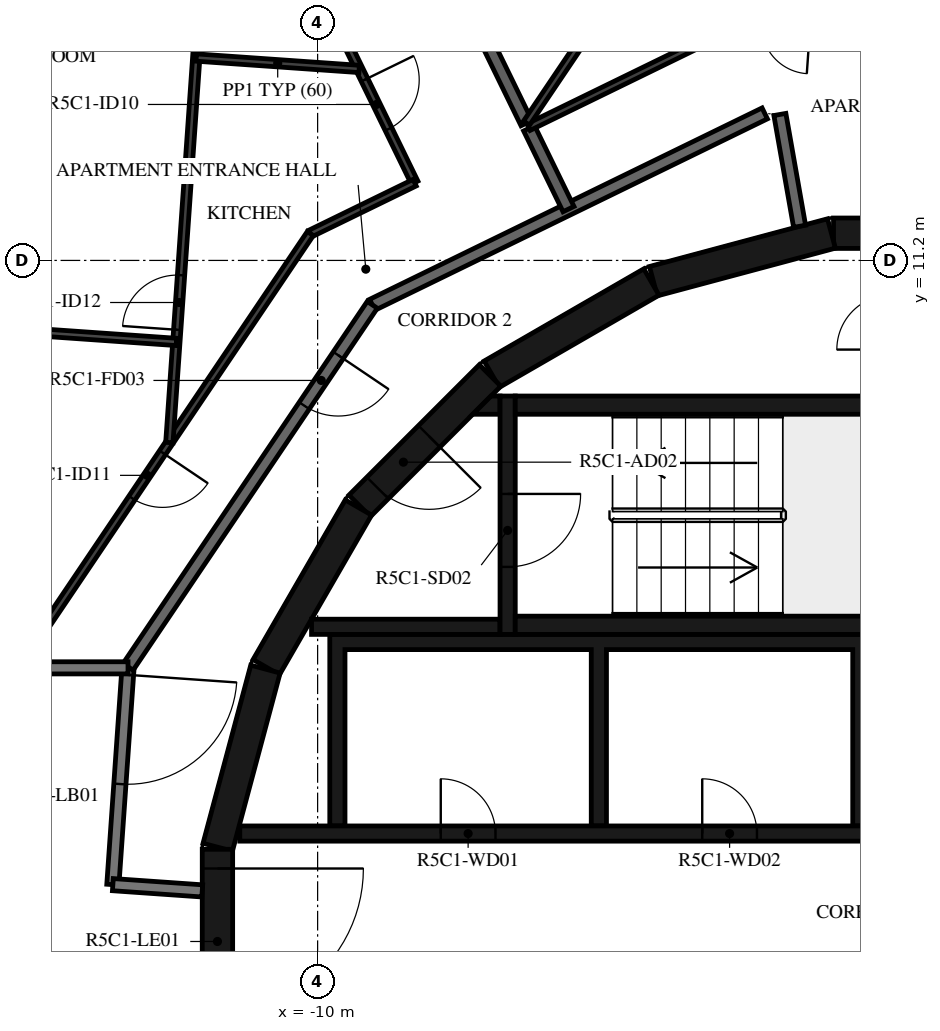
"""IFC4 building model, lengths in metres.
Left out: names, types, materials, properties, quantities, classifications, styles, units other than length and angle.
Written with IfcOpenShell. Run it as: python <this file> out.ifc"""

import sys

from ifc_helpers import new_model, si_unit, direction, frame, frame_2d, origin, place, context, subcontext, project, spatial, polyline, rectangle, outline, extrude, element, fill, save


model = new_model("IFC4")
c1 = context("Model", 3, precision=1e-05, world=origin(), true_north=direction((0.0, 1.0)))
c2 = subcontext(c1, "Body", "Model", "MODEL_VIEW")
j1 = project(units=[si_unit("LENGTHUNIT", "METRE"), si_unit("PLANEANGLEUNIT", "RADIAN")], contexts=[c1])
p1 = place(None, origin())
s1 = spatial("IfcSite", under=j1, at=p1, CompositionType="ELEMENT")
p2 = place(p1, origin())
s2 = spatial("IfcBuilding", under=s1, at=p2, CompositionType="ELEMENT")
p3 = place(p2, frame((0.0, 0.0, 212.9)))
s3 = spatial("IfcBuildingStorey", under=s2, at=p3, CompositionType="ELEMENT", Elevation=212.9)
for number, where, z_axis, x_axis in (
    (1, (1.516, 11.647, 0.0), (0.0, 0.0, 1.0), (-1.0, 0.0, 0.0)),
    (2, (-1.55, 11.643, 0.0), (0.0, 0.0, 1.0), (-0.966, -0.259, 0.0)),
    (3, (-4.51, 10.845, 0.0), (0.0, 0.0, 1.0), (-0.866, -0.5, 0.0)),
):
    element("IfcWall", number, at=place(p3, frame(where, z_axis=z_axis, x_axis=x_axis)), inside=s3, PredefinedType="SHEAR", context=c2, shape_type="SweptSolid", body=[
        extrude(rectangle(XDim=3.033, YDim=0.5, at=frame_2d((1.516, 0.0))), origin(), (0.0, 0.0, 1.0), 3.12),
    ])
p4 = place(p3, frame((-7.164, 9.308, 0.0), z_axis=(0.0, 0.0, 1.0), x_axis=(-0.707106781187, -0.707106781187, 0.0)))
e4 = element("IfcWall", 4, at=p4, inside=s3, PredefinedType="SHEAR", context=c2, shape_type="SweptSolid", body=[
    extrude(rectangle(XDim=3.032, YDim=0.5, at=frame_2d((1.516, 0.0))), origin(), (0.0, 0.0, 1.0), 3.12),
])
p5 = place(p4, frame((1.416, 0.0, 0.0)))
e5 = element("IfcOpeningElement", 5, at=p5, cuts=e4, PredefinedType="OPENING", context=c2, shape_type="SweptSolid", body=[
    extrude(rectangle(XDim=1.2, YDim=2.1, at=frame_2d((0.6, 1.05))), frame((0.0, 0.26, 0.0), z_axis=(0.0, -1.0, 0.0), x_axis=(1.0, 0.0, 0.0)), (0.0, 0.0, 1.0), 0.52),
])
for number, where, z_axis, x_axis in (
    (6, (-9.329, 7.137, 0.0), (0.0, 0.0, 1.0), (-0.5, -0.866, 0.0)),
    (7, (-10.858, 4.479, 0.0), (0.0, 0.0, 1.0), (-0.259, -0.966, 0.0)),
):
    element("IfcWall", number, at=place(p3, frame(where, z_axis=z_axis, x_axis=x_axis)), inside=s3, PredefinedType="SHEAR", context=c2, shape_type="SweptSolid", body=[
        extrude(rectangle(XDim=3.033, YDim=0.5, at=frame_2d((1.516, 0.0))), origin(), (0.0, 0.0, 1.0), 3.12),
    ])
p6 = place(p3, frame((-11.647, 1.516, 0.0), z_axis=(0.0, 0.0, 1.0), x_axis=(0.0, -1.0, 0.0)))
e8 = element("IfcWall", 8, at=p6, inside=s3, PredefinedType="SHEAR", context=c2, shape_type="SweptSolid", body=[
    extrude(rectangle(XDim=3.033, YDim=0.5, at=frame_2d((1.516, 0.0))), origin(), (0.0, 0.0, 1.0), 3.12),
])
p7 = place(p6, frame((0.316, 0.0, 0.0)))
e9 = element("IfcOpeningElement", 9, at=p7, cuts=e8, PredefinedType="OPENING", context=c2, shape_type="SweptSolid", body=[
    extrude(rectangle(XDim=2.4, YDim=2.1, at=frame_2d((1.2, 1.05))), frame((0.0, 0.26, 0.0), z_axis=(0.0, -1.0, 0.0), x_axis=(1.0, 0.0, 0.0)), (0.0, 0.0, 1.0), 0.52),
])
for number, where, z_axis, x_axis in (
    (10, (-6.75, 5.2, 0.0), (0.0, 0.0, 1.0), (1.0, 0.0, 0.0)),
    (11, (-6.75, 8.82, 0.0), (0.0, 0.0, 1.0), (1.0, 0.0, 0.0)),
):
    element("IfcWall", number, at=place(p3, frame(where, z_axis=z_axis, x_axis=x_axis)), inside=s3, PredefinedType="SHEAR", context=c2, shape_type="SweptSolid", body=[
        extrude(rectangle(XDim=6.75, YDim=0.3, at=frame_2d((3.375, 0.0))), origin(), (0.0, 0.0, 1.0), 3.12),
    ])
p8 = place(p3, frame((-6.875, 8.97, 0.0), z_axis=(0.0, 0.0, 1.0), x_axis=(0.0, -1.0, 0.0)))
e12 = element("IfcWall", 12, at=p8, inside=s3, PredefinedType="SHEAR", context=c2, shape_type="SweptSolid", body=[
    extrude(rectangle(XDim=3.92, YDim=0.25, at=frame_2d((1.96, 0.0))), origin(), (0.0, 0.0, 1.0), 3.12),
])
p9 = place(p8, frame((1.61, 0.0, 0.0)))
e13 = element("IfcOpeningElement", 13, at=p9, cuts=e12, PredefinedType="OPENING", context=c2, shape_type="SweptSolid", body=[
    extrude(rectangle(XDim=1.2, YDim=2.1, at=frame_2d((0.6, 1.05))), frame((0.0, 0.135, 0.0), z_axis=(0.0, -1.0, 0.0), x_axis=(1.0, 0.0, 0.0)), (0.0, 0.0, 1.0), 0.27),
])
p10 = place(p3, frame((-7.0, 5.175, 0.0), z_axis=(0.0, 0.0, 1.0), x_axis=(-1.0, 0.0, 0.0)))
e14 = element("IfcWall", 14, at=p10, inside=s3, PredefinedType="SHEAR", context=c2, shape_type="SweptSolid", body=[
    extrude(rectangle(XDim=3.1, YDim=0.25, at=frame_2d((1.55, 0.0))), origin(), (0.0, 0.0, 1.0), 3.12),
])
p11 = place(p3, origin())
e15 = element("IfcWall", 15, at=p11, inside=s3, PredefinedType="SHEAR", context=c2, shape_type="SweptSolid", body=[
    extrude(outline(polyline([(-7.148, 8.97), (-7.0, 8.97), (-7.0, 8.67), (-7.448, 8.67), (-7.148, 8.97)])), origin(), (0.0, 0.0, 1.0), 3.12),
])
p12 = place(p3, origin())
e16 = element("IfcWall", 16, at=p12, inside=s3, PredefinedType="SHEAR", context=c2, shape_type="SweptSolid", body=[
    extrude(outline(polyline([(-9.55, 4.8), (-5.5, 4.8), (-5.5, 1.9), (-5.25, 1.9), (-5.25, 4.8), (-1.2, 4.8), (-1.2, 1.9), (-0.95, 1.9), (-0.95, 4.8), (0.95, 4.8), (0.95, 1.9), (1.2, 1.9), (1.2, 4.8), (3.1, 4.8), (3.1, 1.9), (3.35, 1.9), (3.35, 4.8), (5.25, 4.8), (5.25, 1.9), (5.5, 1.9), (5.5, 4.8), (7.4, 4.8), (7.4, 1.9), (7.65, 1.9), (7.65, 4.8), (9.55, 4.8), (9.55, 1.9), (9.8, 1.9), (9.8, 4.8), (9.8, 5.05), (-9.8, 5.05), (-9.8, 4.8), (-9.8, 1.9), (-9.55, 1.9), (-9.55, 4.8)])), origin(), (0.0, 0.0, 1.0), 3.12),
])
p13 = place(p3, frame((-11.28, 1.775, 0.0), z_axis=(0.0, 0.0, 1.0), x_axis=(1.0, 0.0, 0.0)))
e17 = element("IfcWall", 17, at=p13, inside=s3, PredefinedType="SHEAR", context=c2, shape_type="SweptSolid", body=[
    extrude(rectangle(XDim=14.38, YDim=0.25, at=frame_2d((7.19, 0.0))), origin(), (0.0, 0.0, 1.0), 3.12),
])
p14 = place(p13, frame((10.73, 0.0, 0.0)))
e18 = element("IfcOpeningElement", 18, at=p14, cuts=e17, PredefinedType="OPENING", context=c2, shape_type="SweptSolid", body=[
    extrude(rectangle(XDim=1.1, YDim=2.1, at=frame_2d((0.55, 1.05))), frame((0.0, 0.135, 0.0), z_axis=(0.0, -1.0, 0.0), x_axis=(1.0, 0.0, 0.0)), (0.0, 0.0, 1.0), 0.27),
])
p15 = place(p13, frame((12.88, 0.0, 0.0)))
e19 = element("IfcOpeningElement", 19, at=p15, cuts=e17, PredefinedType="OPENING", context=c2, shape_type="SweptSolid", body=[
    extrude(rectangle(XDim=1.1, YDim=2.1, at=frame_2d((0.55, 1.05))), frame((0.0, 0.135, 0.0), z_axis=(0.0, -1.0, 0.0), x_axis=(1.0, 0.0, 0.0)), (0.0, 0.0, 1.0), 0.27),
])
p16 = place(p13, frame((3.305, 0.0, 0.0)))
e20 = element("IfcOpeningElement", 20, at=p16, cuts=e17, PredefinedType="OPENING", context=c2, shape_type="SweptSolid", body=[
    extrude(rectangle(XDim=0.9, YDim=2.1, at=frame_2d((0.45, 1.05))), frame((0.0, 0.135, 0.0), z_axis=(0.0, -1.0, 0.0), x_axis=(1.0, 0.0, 0.0)), (0.0, 0.0, 1.0), 0.27),
])
p17 = place(p13, frame((7.605, 0.0, 0.0)))
e21 = element("IfcOpeningElement", 21, at=p17, cuts=e17, PredefinedType="OPENING", context=c2, shape_type="SweptSolid", body=[
    extrude(rectangle(XDim=0.9, YDim=2.1, at=frame_2d((0.45, 1.05))), frame((0.0, 0.135, 0.0), z_axis=(0.0, -1.0, 0.0), x_axis=(1.0, 0.0, 0.0)), (0.0, 0.0, 1.0), 0.27),
])
p18 = place(p3, frame((-13.118, 4.5, 0.0), z_axis=(0.0, 0.0, 1.0), x_axis=(-0.069746872611, -0.99756472159, 0.0)))
e22 = element("IfcWall", 22, at=p18, inside=s3, PredefinedType="STANDARD", context=c2, shape_type="SweptSolid", body=[
    extrude(rectangle(XDim=3.574, YDim=0.2, at=frame_2d((1.787, 0.0))), origin(), (0.0, 0.0, 1.0), 3.12),
])
p19 = place(p18, frame((0.115, 0.0, 0.0)))
e23 = element("IfcOpeningElement", 23, at=p19, cuts=e22, PredefinedType="OPENING", context=c2, shape_type="SweptSolid", body=[
    extrude(rectangle(XDim=1.8, YDim=2.1, at=frame_2d((0.9, 1.05))), frame((0.0, 0.11, 0.0), z_axis=(0.0, -1.0, 0.0), x_axis=(1.0, 0.0, 0.0)), (0.0, 0.0, 1.0), 0.22),
])
p20 = place(p3, frame((-13.367, 0.935, 0.0), z_axis=(0.0, 0.0, 1.0), x_axis=(0.997553656289, -0.069904955655, 0.0)))
e24 = element("IfcWall", 24, at=p20, inside=s3, PredefinedType="STANDARD", context=c2, shape_type="SweptSolid", body=[
    extrude(rectangle(XDim=1.474, YDim=0.2, at=frame_2d((0.737, 0.0))), origin(), (0.0, 0.0, 1.0), 3.12),
])
p21 = place(p3, frame((-2.074, 11.761, 0.0), z_axis=(0.0, 0.0, 1.0), x_axis=(-0.173740587112, 0.984791454263, 0.0)))
e25 = element("IfcWall", 25, at=p21, inside=s3, PredefinedType="STANDARD", context=c2, shape_type="SweptSolid", body=[
    extrude(rectangle(XDim=1.867, YDim=0.2, at=frame_2d((0.934, 0.0))), origin(), (0.0, 0.0, 1.0), 3.12),
])
p22 = place(p3, frame((-2.647, 13.618, 0.0), z_axis=(0.0, 0.0, 1.0), x_axis=(-0.898796543751, -0.438366026218, 0.0)))
e26 = element("IfcWall", 26, at=p22, inside=s3, PredefinedType="STANDARD", context=c2, shape_type="SweptSolid", body=[
    extrude(rectangle(XDim=7.181, YDim=0.2, at=frame_2d((3.591, 0.0))), origin(), (0.0, 0.0, 1.0), 3.12),
])
p23 = place(p3, frame((-9.101, 10.47, 0.0), z_axis=(0.0, 0.0, 1.0), x_axis=(-0.559195469534, -0.829035841718, 0.0)))
e27 = element("IfcWall", 27, at=p23, inside=s3, PredefinedType="STANDARD", context=c2, shape_type="SweptSolid", body=[
    extrude(rectangle(XDim=7.181, YDim=0.2, at=frame_2d((3.591, 0.0))), origin(), (0.0, 0.0, 1.0), 3.12),
])
p24 = place(p23, frame((1.0, 0.0, 0.0)))
e28 = element("IfcOpeningElement", 28, at=p24, cuts=e27, PredefinedType="OPENING", context=c2, shape_type="SweptSolid", body=[
    extrude(rectangle(XDim=1.0, YDim=2.1, at=frame_2d((0.5, 1.05))), frame((0.0, 0.11, 0.0), z_axis=(0.0, -1.0, 0.0), x_axis=(1.0, 0.0, 0.0)), (0.0, 0.0, 1.0), 0.22),
])
p25 = place(p3, frame((-13.118, 4.5, 0.0), z_axis=(0.0, 0.0, 1.0), x_axis=(-1.0, 0.0, 0.0)))
e29 = element("IfcWall", 29, at=p25, inside=s3, PredefinedType="STANDARD", context=c2, shape_type="SweptSolid", body=[
    extrude(rectangle(XDim=4.782, YDim=0.2, at=frame_2d((2.391, 0.0))), origin(), (0.0, 0.0, 1.0), 3.12),
])
p26 = place(p3, frame((-6.522, 13.373, 0.0), z_axis=(0.0, 0.0, 1.0), x_axis=(0.438277270821, -0.8988398266, 0.0)))
e30 = element("IfcWall", 30, at=p26, inside=s3, PredefinedType="STANDARD", context=c2, shape_type="SweptSolid", body=[
    extrude(rectangle(XDim=1.479, YDim=0.2, at=frame_2d((0.74, 0.0))), origin(), (0.0, 0.0, 1.0), 3.12),
])
p27 = place(p3, frame((-8.219, 16.851, 0.0), z_axis=(0.0, 0.0, 1.0), x_axis=(0.438291091101, -0.898833087654, 0.0)))
e31 = element("IfcWall", 31, at=p27, inside=s3, PredefinedType="STANDARD", context=c2, shape_type="SweptSolid", body=[
    extrude(rectangle(XDim=3.774, YDim=0.2, at=frame_2d((1.887, 0.0))), origin(), (0.0, 0.0, 1.0), 3.12),
])
p28 = place(p3, frame((4.477, 14.623, 0.0), z_axis=(0.0, 0.0, 1.0), x_axis=(-0.997564862172, 0.069744861884, 0.0)))
e32 = element("IfcWall", 32, at=p28, inside=s3, PredefinedType="PARTITIONING", context=c2, shape_type="SweptSolid", body=[
    extrude(rectangle(XDim=7.438, YDim=0.12, at=frame_2d((3.719, 0.0))), origin(), (0.0, 0.0, 1.0), 3.12),
])
p29 = place(p28, frame((0.2, 0.0, 0.0)))
e33 = element("IfcOpeningElement", 33, at=p29, cuts=e32, PredefinedType="OPENING", context=c2, shape_type="SweptSolid", body=[
    extrude(rectangle(XDim=0.9, YDim=2.1, at=frame_2d((0.45, 1.05))), frame((0.0, 0.07, 0.0), z_axis=(0.0, -1.0, 0.0), x_axis=(1.0, 0.0, 0.0)), (0.0, 0.0, 1.0), 0.14),
])
p30 = place(p28, frame((6.392, 0.0, 0.0)))
e34 = element("IfcOpeningElement", 34, at=p30, cuts=e32, PredefinedType="OPENING", context=c2, shape_type="SweptSolid", body=[
    extrude(rectangle(XDim=0.8, YDim=2.1, at=frame_2d((0.4, 1.05))), frame((0.0, 0.07, 0.0), z_axis=(0.0, -1.0, 0.0), x_axis=(1.0, 0.0, 0.0)), (0.0, 0.0, 1.0), 0.14),
])
p31 = place(p3, frame((-2.943, 15.142, 0.0), z_axis=(0.0, 0.0, 1.0), x_axis=(-0.89881075705, -0.438336883014, 0.0)))
e35 = element("IfcWall", 35, at=p31, inside=s3, PredefinedType="PARTITIONING", context=c2, shape_type="SweptSolid", body=[
    extrude(rectangle(XDim=3.992, YDim=0.12, at=frame_2d((1.996, 0.0))), origin(), (0.0, 0.0, 1.0), 3.12),
])
p32 = place(p3, frame((-3.939, 17.35, 0.0), z_axis=(0.0, 0.0, 1.0), x_axis=(-0.559193216274, -0.829037361566, 0.0)))
e36 = element("IfcWall", 36, at=p32, inside=s3, PredefinedType="PARTITIONING", context=c2, shape_type="SweptSolid", body=[
    extrude(rectangle(XDim=4.694, YDim=0.12, at=frame_2d((2.347, 0.0))), origin(), (0.0, 0.0, 1.0), 3.12),
])
p33 = place(p3, frame((-10.5, 16.775, 0.0), z_axis=(0.0, 0.0, 1.0), x_axis=(0.438345136783, -0.898806731761, 0.0)))
e37 = element("IfcWall", 37, at=p33, inside=s3, PredefinedType="PARTITIONING", context=c2, shape_type="SweptSolid", body=[
    extrude(rectangle(XDim=4.78, YDim=0.12, at=frame_2d((2.39, 0.0))), origin(), (0.0, 0.0, 1.0), 3.12),
])
p34 = place(p33, frame((0.7, 0.0, 0.0)))
e38 = element("IfcOpeningElement", 38, at=p34, cuts=e37, PredefinedType="OPENING", context=c2, shape_type="SweptSolid", body=[
    extrude(rectangle(XDim=0.8, YDim=2.1, at=frame_2d((0.4, 1.05))), frame((0.0, 0.07, 0.0), z_axis=(0.0, -1.0, 0.0), x_axis=(1.0, 0.0, 0.0)), (0.0, 0.0, 1.0), 0.14),
])
p35 = place(p33, frame((2.899, 0.0, 0.0)))
e39 = element("IfcOpeningElement", 39, at=p35, cuts=e37, PredefinedType="OPENING", context=c2, shape_type="SweptSolid", body=[
    extrude(rectangle(XDim=0.9, YDim=2.1, at=frame_2d((0.45, 1.05))), frame((0.0, 0.07, 0.0), z_axis=(0.0, -1.0, 0.0), x_axis=(1.0, 0.0, 0.0)), (0.0, 0.0, 1.0), 0.14),
])
p36 = place(p3, frame((-8.405, 12.479, 0.0), z_axis=(0.0, 0.0, 1.0), x_axis=(-0.898784427692, -0.438390867307, 0.0)))
e40 = element("IfcWall", 40, at=p36, inside=s3, PredefinedType="PARTITIONING", context=c2, shape_type="SweptSolid", body=[
    extrude(rectangle(XDim=1.908, YDim=0.12, at=frame_2d((0.954, 0.0))), origin(), (0.0, 0.0, 1.0), 3.12),
])
p37 = place(p3, frame((-10.12, 11.642, 0.0), z_axis=(0.0, 0.0, 1.0), x_axis=(-0.55920080659, -0.829032241779, 0.0)))
e41 = element("IfcWall", 41, at=p37, inside=s3, PredefinedType="PARTITIONING", context=c2, shape_type="SweptSolid", body=[
    extrude(rectangle(XDim=7.985, YDim=0.12, at=frame_2d((3.992, 0.0))), origin(), (0.0, 0.0, 1.0), 3.12),
])
p38 = place(p37, frame((4.346, 0.0, 0.0)))
e42 = element("IfcOpeningElement", 42, at=p38, cuts=e41, PredefinedType="OPENING", context=c2, shape_type="SweptSolid", body=[
    extrude(rectangle(XDim=0.9, YDim=2.1, at=frame_2d((0.45, 1.05))), frame((0.0, 0.07, 0.0), z_axis=(0.0, -1.0, 0.0), x_axis=(1.0, 0.0, 0.0)), (0.0, 0.0, 1.0), 0.14),
])
p39 = place(p3, frame((-12.439, 8.204, 0.0), z_axis=(0.0, 0.0, 1.0), x_axis=(0.069750037523, 0.997564500303, 0.0)))
e43 = element("IfcWall", 43, at=p39, inside=s3, PredefinedType="PARTITIONING", context=c2, shape_type="SweptSolid", body=[
    extrude(rectangle(XDim=10.014, YDim=0.12, at=frame_2d((5.007, 0.0))), origin(), (0.0, 0.0, 1.0), 3.12),
])
p40 = place(p39, frame((1.859, 0.0, 0.0)))
e44 = element("IfcOpeningElement", 44, at=p40, cuts=e43, PredefinedType="OPENING", context=c2, shape_type="SweptSolid", body=[
    extrude(rectangle(XDim=0.9, YDim=2.1, at=frame_2d((0.45, 1.05))), frame((0.0, 0.07, 0.0), z_axis=(0.0, -1.0, 0.0), x_axis=(1.0, 0.0, 0.0)), (0.0, 0.0, 1.0), 0.14),
])
p41 = place(p3, frame((-11.996, 14.536, 0.0), z_axis=(0.0, 0.0, 1.0), x_axis=(0.997565991425, -0.069728708231, 0.0)))
e45 = element("IfcWall", 45, at=p41, inside=s3, PredefinedType="PARTITIONING", context=c2, shape_type="SweptSolid", body=[
    extrude(rectangle(XDim=2.686, YDim=0.12, at=frame_2d((1.343, 0.0))), origin(), (0.0, 0.0, 1.0), 3.12),
])
p42 = place(p3, frame((-17.51, 10.222, 0.0), z_axis=(0.0, 0.0, 1.0), x_axis=(0.997563184303, -0.069768856397, 0.0)))
e46 = element("IfcWall", 46, at=p42, inside=s3, PredefinedType="PARTITIONING", context=c2, shape_type="SweptSolid", body=[
    extrude(rectangle(XDim=5.2, YDim=0.12, at=frame_2d((2.6, 0.0))), origin(), (0.0, 0.0, 1.0), 2.73),
])
p43 = place(p9, origin())
e47 = element("IfcDoor", 47, at=p43, inside=s3, OperationType="SINGLE_SWING_LEFT", PredefinedType="DOOR", context=c2, shape_type="SweptSolid", body=[
    extrude(rectangle(XDim=1.2, YDim=2.1, at=frame_2d((0.6, 1.05))), frame((0.0, 0.025, 0.0), z_axis=(0.0, -1.0, 0.0), x_axis=(1.0, 0.0, 0.0)), (0.0, 0.0, 1.0), 0.05),
])
fill(e13, e47)
p44 = place(p5, origin())
e48 = element("IfcDoor", 48, at=p44, inside=s3, OperationType="SINGLE_SWING_RIGHT", PredefinedType="DOOR", context=c2, shape_type="SweptSolid", body=[
    extrude(rectangle(XDim=1.2, YDim=2.1, at=frame_2d((0.6, 1.05))), frame((0.0, 0.025, 0.0), z_axis=(0.0, -1.0, 0.0), x_axis=(1.0, 0.0, 0.0)), (0.0, 0.0, 1.0), 0.05),
])
fill(e5, e48)
p45 = place(p7, origin())
e49 = element("IfcDoor", 49, at=p45, inside=s3, OperationType="DOUBLE_DOOR_SINGLE_SWING", PredefinedType="DOOR", context=c2, shape_type="SweptSolid", body=[
    extrude(rectangle(XDim=2.4, YDim=2.1, at=frame_2d((1.2, 1.05))), frame((0.0, 0.025, 0.0), z_axis=(0.0, -1.0, 0.0), x_axis=(1.0, 0.0, 0.0)), (0.0, 0.0, 1.0), 0.05),
])
fill(e9, e49)
p46 = place(p16, origin())
e50 = element("IfcDoor", 50, at=p46, inside=s3, OperationType="SINGLE_SWING_LEFT", PredefinedType="DOOR", context=c2, shape_type="SweptSolid", body=[
    extrude(rectangle(XDim=0.9, YDim=2.1, at=frame_2d((0.45, 1.05))), frame((0.0, 0.025, 0.0), z_axis=(0.0, -1.0, 0.0), x_axis=(1.0, 0.0, 0.0)), (0.0, 0.0, 1.0), 0.05),
])
fill(e20, e50)
p47 = place(p17, origin())
e51 = element("IfcDoor", 51, at=p47, inside=s3, OperationType="SINGLE_SWING_RIGHT", PredefinedType="DOOR", context=c2, shape_type="SweptSolid", body=[
    extrude(rectangle(XDim=0.9, YDim=2.1, at=frame_2d((0.45, 1.05))), frame((0.0, 0.025, 0.0), z_axis=(0.0, -1.0, 0.0), x_axis=(1.0, 0.0, 0.0)), (0.0, 0.0, 1.0), 0.05),
])
fill(e21, e51)
p48 = place(p24, origin())
e52 = element("IfcDoor", 52, at=p48, inside=s3, OperationType="SINGLE_SWING_LEFT", PredefinedType="DOOR", context=c2, shape_type="SweptSolid", body=[
    extrude(rectangle(XDim=1.0, YDim=2.1, at=frame_2d((0.5, 1.05))), frame((0.0, 0.025, 0.0), z_axis=(0.0, -1.0, 0.0), x_axis=(1.0, 0.0, 0.0)), (0.0, 0.0, 1.0), 0.05),
])
fill(e28, e52)
p49 = place(p35, origin())
e53 = element("IfcDoor", 53, at=p49, inside=s3, OperationType="SINGLE_SWING_LEFT", PredefinedType="DOOR", context=c2, shape_type="SweptSolid", body=[
    extrude(rectangle(XDim=0.9, YDim=2.1, at=frame_2d((0.45, 1.05))), frame((0.0, 0.025, 0.0), z_axis=(0.0, -1.0, 0.0), x_axis=(1.0, 0.0, 0.0)), (0.0, 0.0, 1.0), 0.05),
])
fill(e39, e53)
p50 = place(p38, origin())
e54 = element("IfcDoor", 54, at=p50, inside=s3, OperationType="SINGLE_SWING_LEFT", PredefinedType="DOOR", context=c2, shape_type="SweptSolid", body=[
    extrude(rectangle(XDim=0.9, YDim=2.1, at=frame_2d((0.45, 1.05))), frame((0.0, 0.025, 0.0), z_axis=(0.0, -1.0, 0.0), x_axis=(1.0, 0.0, 0.0)), (0.0, 0.0, 1.0), 0.05),
])
fill(e42, e54)
p51 = place(p40, origin())
e55 = element("IfcDoor", 55, at=p51, inside=s3, OperationType="SINGLE_SWING_LEFT", PredefinedType="DOOR", context=c2, shape_type="SweptSolid", body=[
    extrude(rectangle(XDim=0.9, YDim=2.1, at=frame_2d((0.45, 1.05))), frame((0.0, 0.025, 0.0), z_axis=(0.0, -1.0, 0.0), x_axis=(1.0, 0.0, 0.0)), (0.0, 0.0, 1.0), 0.05),
])
fill(e44, e55)
p52 = place(p19, origin())
e56 = element("IfcDoor", 56, at=p52, inside=s3, OperationType="DOUBLE_DOOR_SINGLE_SWING", PredefinedType="DOOR", context=c2, shape_type="SweptSolid", body=[
    extrude(rectangle(XDim=1.8, YDim=2.1, at=frame_2d((0.9, 1.05))), frame((0.0, 0.025, 0.0), z_axis=(0.0, -1.0, 0.0), x_axis=(1.0, 0.0, 0.0)), (0.0, 0.0, 1.0), 0.05),
])
fill(e23, e56)
save(model, sys.argv[1])
